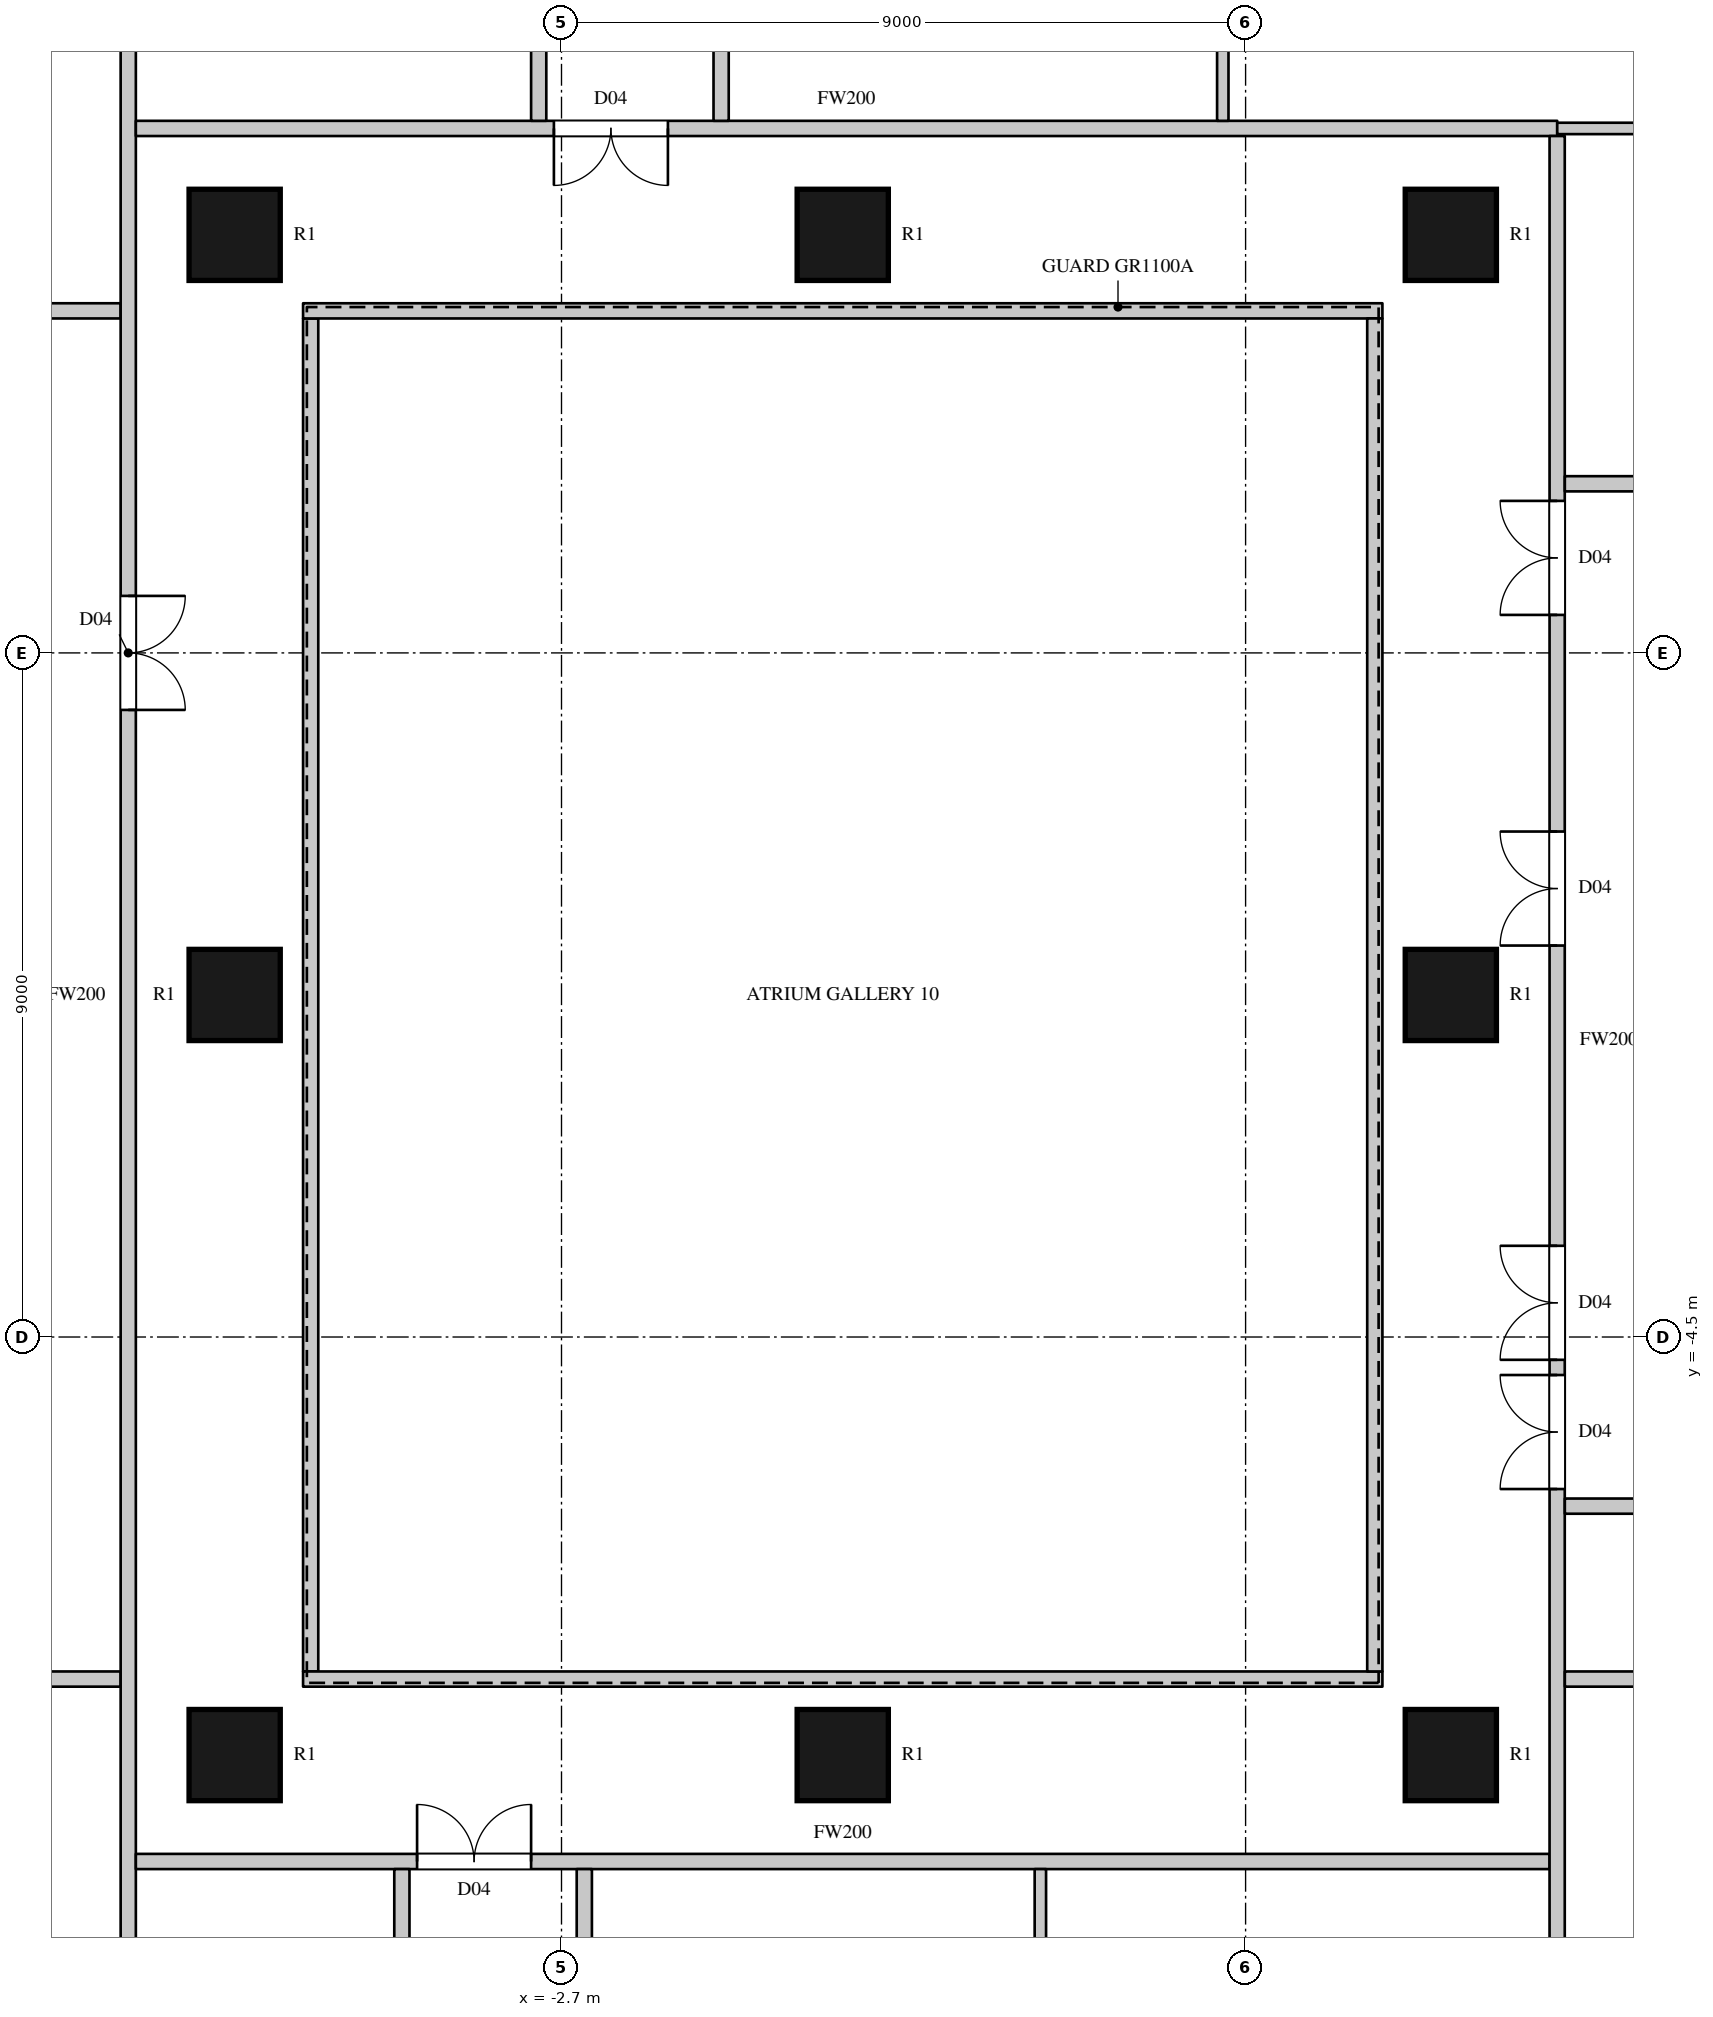
"""IFC4 building model, lengths in metres.
Left out: names, types, materials, properties, quantities, classifications, styles, units other than length and angle.
Written with IfcOpenShell. Run it as: python <this file> out.ifc"""

import sys

from ifc_helpers import new_model, si_unit, direction, frame, frame_2d, origin, origin_2d, place, context, subcontext, project, spatial, rectangle, circle, extrude, element, fill, save


model = new_model("IFC4")
c1 = context("Model", 3, precision=1e-05, world=origin(), true_north=direction((0.0, 1.0)))
c2 = subcontext(c1, "Body", "Model", "MODEL_VIEW")
j1 = project(units=[si_unit("LENGTHUNIT", "METRE"), si_unit("PLANEANGLEUNIT", "RADIAN")], contexts=[c1])
p1 = place(None, origin())
s1 = spatial("IfcSite", under=j1, at=p1, CompositionType="ELEMENT")
p2 = place(p1, origin())
s2 = spatial("IfcBuilding", under=s1, at=p2, CompositionType="ELEMENT")
p3 = place(p2, frame((0.0, 0.0, 66.3)))
s3 = spatial("IfcBuildingStorey", under=s2, at=p3, CompositionType="ELEMENT", Elevation=66.3)
for number, where, z_axis, x_axis in (
    (1, (-7.0, -10.0, 0.0), (0.0, 0.0, 1.0), (1.0, 0.0, 0.0)),
    (2, (-7.0, 0.0, 0.0), (0.0, 0.0, 1.0), (1.0, 0.0, 0.0)),
    (3, (-7.0, 10.0, 0.0), (0.0, 0.0, 1.0), (1.0, 0.0, 0.0)),
    (4, (1.0, -10.0, 0.0), (0.0, 0.0, 1.0), (1.0, 0.0, 0.0)),
    (5, (1.0, 10.0, 0.0), (0.0, 0.0, 1.0), (1.0, 0.0, 0.0)),
    (6, (9.0, -10.0, 0.0), (0.0, 0.0, 1.0), (1.0, 0.0, 0.0)),
    (7, (9.0, 0.0, 0.0), (0.0, 0.0, 1.0), (1.0, 0.0, 0.0)),
    (8, (9.0, 10.0, 0.0), (0.0, 0.0, 1.0), (1.0, 0.0, 0.0)),
):
    element("IfcColumn", number, at=place(p3, frame(where, z_axis=z_axis, x_axis=x_axis)), inside=s3, PredefinedType="COLUMN", context=c2, shape_type="SweptSolid", body=[
        extrude(circle(Radius=0.6, at=origin_2d()), origin(), (0.0, 0.0, 1.0), 3.6),
    ])
p4 = place(p3, frame((-13.97, -9.0, 0.0), z_axis=(0.0, 0.0, 1.0), x_axis=(1.0, 0.0, 0.0)))
e9 = element("IfcWall", 9, at=p4, inside=s3, PredefinedType="PARTITIONING", context=c2, shape_type="SweptSolid", body=[
    extrude(rectangle(XDim=5.47, YDim=0.2, at=frame_2d((2.735, 0.0))), origin(), (0.0, 0.0, 1.0), 3.3),
])
p5 = place(p4, frame((0.4, 0.0, 0.0)))
e10 = element("IfcOpeningElement", 10, at=p5, cuts=e9, PredefinedType="OPENING", context=c2, shape_type="SweptSolid", body=[
    extrude(rectangle(XDim=1.5, YDim=2.2, at=frame_2d((0.75, 1.1))), frame((0.0, 0.11, 0.0), z_axis=(0.0, -1.0, 0.0), x_axis=(1.0, 0.0, 0.0)), (0.0, 0.0, 1.0), 0.22),
])
p6 = place(p4, frame((2.05, 0.0, 0.0)))
e11 = element("IfcOpeningElement", 11, at=p6, cuts=e9, PredefinedType="OPENING", context=c2, shape_type="SweptSolid", body=[
    extrude(rectangle(XDim=1.5, YDim=2.2, at=frame_2d((0.75, 1.1))), frame((0.0, 0.11, 0.0), z_axis=(0.0, -1.0, 0.0), x_axis=(1.0, 0.0, 0.0)), (0.0, 0.0, 1.0), 0.22),
])
p7 = place(p3, frame((-13.97, 9.0, 0.0), z_axis=(0.0, 0.0, 1.0), x_axis=(1.0, 0.0, 0.0)))
e12 = element("IfcWall", 12, at=p7, inside=s3, PredefinedType="PARTITIONING", context=c2, shape_type="SweptSolid", body=[
    extrude(rectangle(XDim=5.47, YDim=0.2, at=frame_2d((2.735, 0.0))), origin(), (0.0, 0.0, 1.0), 3.3),
])
p8 = place(p3, frame((-8.4, -17.4, 0.0), z_axis=(0.0, 0.0, 1.0), x_axis=(0.0, 1.0, 0.0)))
e13 = element("IfcWall", 13, at=p8, inside=s3, PredefinedType="PARTITIONING", context=c2, shape_type="SweptSolid", body=[
    extrude(rectangle(XDim=34.8, YDim=0.2, at=frame_2d((17.4, 0.0))), origin(), (0.0, 0.0, 1.0), 3.3),
])
p9 = place(p8, frame((21.15, 0.0, 0.0)))
e14 = element("IfcOpeningElement", 14, at=p9, cuts=e13, PredefinedType="OPENING", context=c2, shape_type="SweptSolid", body=[
    extrude(rectangle(XDim=1.5, YDim=2.2, at=frame_2d((0.75, 1.1))), frame((0.0, 0.11, 0.0), z_axis=(0.0, -1.0, 0.0), x_axis=(1.0, 0.0, 0.0)), (0.0, 0.0, 1.0), 0.22),
])
p10 = place(p8, frame((33.75, 0.0, 0.0)))
e15 = element("IfcOpeningElement", 15, at=p10, cuts=e13, PredefinedType="OPENING", context=c2, shape_type="SweptSolid", body=[
    extrude(rectangle(XDim=0.9, YDim=2.2, at=frame_2d((0.45, 1.1))), frame((0.0, 0.11, 0.0), z_axis=(0.0, -1.0, 0.0), x_axis=(1.0, 0.0, 0.0)), (0.0, 0.0, 1.0), 0.22),
])
p11 = place(p8, frame((0.15, 0.0, 0.0)))
e16 = element("IfcOpeningElement", 16, at=p11, cuts=e13, PredefinedType="OPENING", context=c2, shape_type="SweptSolid", body=[
    extrude(rectangle(XDim=0.95, YDim=2.2, at=frame_2d((0.475, 1.1))), frame((0.0, 0.11, 0.0), z_axis=(0.0, -1.0, 0.0), x_axis=(1.0, 0.0, 0.0)), (0.0, 0.0, 1.0), 0.22),
])
p12 = place(p3, frame((-8.3, -11.4, 0.0), z_axis=(0.0, 0.0, 1.0), x_axis=(1.0, 0.0, 0.0)))
e17 = element("IfcWall", 17, at=p12, inside=s3, PredefinedType="PARTITIONING", context=c2, shape_type="SweptSolid", body=[
    extrude(rectangle(XDim=18.6, YDim=0.2, at=frame_2d((9.3, 0.0))), origin(), (0.0, 0.0, 1.0), 3.3),
])
p13 = place(p12, frame((3.7, 0.0, 0.0)))
e18 = element("IfcOpeningElement", 18, at=p13, cuts=e17, PredefinedType="OPENING", context=c2, shape_type="SweptSolid", body=[
    extrude(rectangle(XDim=1.5, YDim=2.2, at=frame_2d((0.75, 1.1))), frame((0.0, 0.11, 0.0), z_axis=(0.0, -1.0, 0.0), x_axis=(1.0, 0.0, 0.0)), (0.0, 0.0, 1.0), 0.22),
])
p14 = place(p3, frame((-8.3, 11.4, 0.0), z_axis=(0.0, 0.0, 1.0), x_axis=(1.0, 0.0, 0.0)))
e19 = element("IfcWall", 19, at=p14, inside=s3, PredefinedType="PARTITIONING", context=c2, shape_type="SweptSolid", body=[
    extrude(rectangle(XDim=18.7, YDim=0.2, at=frame_2d((9.35, 0.0))), origin(), (0.0, 0.0, 1.0), 3.3),
])
p15 = place(p14, frame((5.5, 0.0, 0.0)))
e20 = element("IfcOpeningElement", 20, at=p15, cuts=e19, PredefinedType="OPENING", context=c2, shape_type="SweptSolid", body=[
    extrude(rectangle(XDim=1.5, YDim=2.2, at=frame_2d((0.75, 1.1))), frame((0.0, 0.11, 0.0), z_axis=(0.0, -1.0, 0.0), x_axis=(1.0, 0.0, 0.0)), (0.0, 0.0, 1.0), 0.22),
])
p16 = place(p3, frame((-6.0, -8.9, 0.0), z_axis=(0.0, 0.0, 1.0), x_axis=(0.0, 1.0, 0.0)))
e21 = element("IfcWall", 21, at=p16, inside=s3, PredefinedType="PARTITIONING", context=c2, shape_type="SweptSolid", body=[
    extrude(rectangle(XDim=17.8, YDim=0.2, at=frame_2d((8.9, 0.0))), origin(), (0.0, 0.0, 1.0), 3.3),
])
for number, where, z_axis, x_axis in (
    (22, (-6.1, -9.0, 0.0), (0.0, 0.0, 1.0), (1.0, 0.0, 0.0)),
    (23, (-6.1, 9.0, 0.0), (0.0, 0.0, 1.0), (1.0, 0.0, 0.0)),
):
    element("IfcWall", number, at=place(p3, frame(where, z_axis=z_axis, x_axis=x_axis)), inside=s3, PredefinedType="PARTITIONING", context=c2, shape_type="SweptSolid", body=[
        extrude(rectangle(XDim=14.2, YDim=0.2, at=frame_2d((7.1, 0.0))), origin(), (0.0, 0.0, 1.0), 3.3),
    ])
p17 = place(p3, frame((-4.8, -17.4, 0.0), z_axis=(0.0, 0.0, 1.0), x_axis=(0.0, 1.0, 0.0)))
e24 = element("IfcWall", 24, at=p17, inside=s3, PredefinedType="PARTITIONING", context=c2, shape_type="SweptSolid", body=[
    extrude(rectangle(XDim=5.9, YDim=0.2, at=frame_2d((2.95, 0.0))), origin(), (0.0, 0.0, 1.0), 3.3),
])
p18 = place(p3, frame((-3.0, 11.5, 0.0), z_axis=(0.0, 0.0, 1.0), x_axis=(0.0, 1.0, 0.0)))
e25 = element("IfcWall", 25, at=p18, inside=s3, PredefinedType="PARTITIONING", context=c2, shape_type="SweptSolid", body=[
    extrude(rectangle(XDim=5.443, YDim=0.2, at=frame_2d((2.722, 0.0))), origin(), (0.0, 0.0, 1.0), 3.3),
])
p19 = place(p3, frame((-2.4, -16.943, 0.0), z_axis=(0.0, 0.0, 1.0), x_axis=(0.0, 1.0, 0.0)))
e26 = element("IfcWall", 26, at=p19, inside=s3, PredefinedType="PARTITIONING", context=c2, shape_type="SweptSolid", body=[
    extrude(rectangle(XDim=5.443, YDim=0.2, at=frame_2d((2.722, 0.0))), origin(), (0.0, 0.0, 1.0), 3.3),
])
p20 = place(p19, frame((0.3, 0.0, 0.0)))
e27 = element("IfcOpeningElement", 27, at=p20, cuts=e26, PredefinedType="OPENING", context=c2, shape_type="SweptSolid", body=[
    extrude(rectangle(XDim=0.95, YDim=2.2, at=frame_2d((0.475, 1.1))), frame((0.0, 0.11, 0.0), z_axis=(0.0, -1.0, 0.0), x_axis=(1.0, 0.0, 0.0)), (0.0, 0.0, 1.0), 0.22),
])
p21 = place(p3, frame((-0.6, 11.5, 0.0), z_axis=(0.0, 0.0, 1.0), x_axis=(0.0, 1.0, 0.0)))
e28 = element("IfcWall", 28, at=p21, inside=s3, PredefinedType="PARTITIONING", context=c2, shape_type="SweptSolid", body=[
    extrude(rectangle(XDim=5.9, YDim=0.2, at=frame_2d((2.95, 0.0))), origin(), (0.0, 0.0, 1.0), 3.3),
])
p22 = place(p21, frame((4.15, 0.0, 0.0)))
e29 = element("IfcOpeningElement", 29, at=p22, cuts=e28, PredefinedType="OPENING", context=c2, shape_type="SweptSolid", body=[
    extrude(rectangle(XDim=1.6, YDim=2.4, at=frame_2d((0.8, 1.2))), frame((0.0, 0.11, 0.0), z_axis=(0.0, -1.0, 0.0), x_axis=(1.0, 0.0, 0.0)), (0.0, 0.0, 1.0), 0.22),
])
p23 = place(p3, frame((8.0, -8.9, 0.0), z_axis=(0.0, 0.0, 1.0), x_axis=(0.0, 1.0, 0.0)))
e30 = element("IfcWall", 30, at=p23, inside=s3, PredefinedType="PARTITIONING", context=c2, shape_type="SweptSolid", body=[
    extrude(rectangle(XDim=17.8, YDim=0.2, at=frame_2d((8.9, 0.0))), origin(), (0.0, 0.0, 1.0), 3.3),
])
p24 = place(p3, frame((10.399, -12.5, 0.0), z_axis=(0.0, 0.0, 1.0), x_axis=(0.0, 1.0, 0.0)))
e31 = element("IfcWall", 31, at=p24, inside=s3, PredefinedType="PARTITIONING", context=c2, shape_type="SweptSolid", body=[
    extrude(rectangle(XDim=23.8, YDim=0.2, at=frame_2d((11.9, 0.0))), origin(), (0.0, 0.0, 1.0), 3.3),
])
p25 = place(p24, frame((6.0, 0.0, 0.0)))
e32 = element("IfcOpeningElement", 32, at=p25, cuts=e31, PredefinedType="OPENING", context=c2, shape_type="SweptSolid", body=[
    extrude(rectangle(XDim=1.5, YDim=2.2, at=frame_2d((0.75, 1.1))), frame((0.0, 0.11, 0.0), z_axis=(0.0, -1.0, 0.0), x_axis=(1.0, 0.0, 0.0)), (0.0, 0.0, 1.0), 0.22),
])
p26 = place(p24, frame((17.5, 0.0, 0.0)))
e33 = element("IfcOpeningElement", 33, at=p26, cuts=e31, PredefinedType="OPENING", context=c2, shape_type="SweptSolid", body=[
    extrude(rectangle(XDim=1.5, YDim=2.2, at=frame_2d((0.75, 1.1))), frame((0.0, 0.11, 0.0), z_axis=(0.0, -1.0, 0.0), x_axis=(1.0, 0.0, 0.0)), (0.0, 0.0, 1.0), 0.22),
])
p27 = place(p24, frame((7.7, 0.0, 0.0)))
e34 = element("IfcOpeningElement", 34, at=p27, cuts=e31, PredefinedType="OPENING", context=c2, shape_type="SweptSolid", body=[
    extrude(rectangle(XDim=1.5, YDim=2.2, at=frame_2d((0.75, 1.1))), frame((0.0, 0.11, 0.0), z_axis=(0.0, -1.0, 0.0), x_axis=(1.0, 0.0, 0.0)), (0.0, 0.0, 1.0), 0.22),
])
p28 = place(p24, frame((13.15, 0.0, 0.0)))
e35 = element("IfcOpeningElement", 35, at=p28, cuts=e31, PredefinedType="OPENING", context=c2, shape_type="SweptSolid", body=[
    extrude(rectangle(XDim=1.5, YDim=2.2, at=frame_2d((0.75, 1.1))), frame((0.0, 0.11, 0.0), z_axis=(0.0, -1.0, 0.0), x_axis=(1.0, 0.0, 0.0)), (0.0, 0.0, 1.0), 0.22),
])
p29 = place(p3, frame((10.5, -9.0, 0.0), z_axis=(0.0, 0.0, 1.0), x_axis=(1.0, 0.0, 0.0)))
e36 = element("IfcWall", 36, at=p29, inside=s3, PredefinedType="PARTITIONING", context=c2, shape_type="SweptSolid", body=[
    extrude(rectangle(XDim=5.7, YDim=0.2, at=frame_2d((2.85, 0.0))), origin(), (0.0, 0.0, 1.0), 2.65),
])
p30 = place(p29, frame((4.45, 0.0, 0.0)))
e37 = element("IfcOpeningElement", 37, at=p30, cuts=e36, PredefinedType="OPENING", context=c2, shape_type="SweptSolid", body=[
    extrude(rectangle(XDim=0.95, YDim=2.2, at=frame_2d((0.475, 1.1))), frame((0.0, 0.11, 0.0), z_axis=(0.0, -1.0, 0.0), x_axis=(1.0, 0.0, 0.0)), (0.0, 0.0, 1.0), 0.22),
])
p31 = place(p3, frame((10.5, -6.725, 0.0), z_axis=(0.0, 0.0, 1.0), x_axis=(1.0, 0.0, 0.0)))
e38 = element("IfcWall", 38, at=p31, inside=s3, PredefinedType="PARTITIONING", context=c2, shape_type="SweptSolid", body=[
    extrude(rectangle(XDim=5.7, YDim=0.2, at=frame_2d((2.85, 0.0))), origin(), (0.0, 0.0, 1.0), 3.3),
])
p32 = place(p3, frame((10.5, 6.725, 0.0), z_axis=(0.0, 0.0, 1.0), x_axis=(1.0, 0.0, 0.0)))
e39 = element("IfcWall", 39, at=p32, inside=s3, PredefinedType="PARTITIONING", context=c2, shape_type="SweptSolid", body=[
    extrude(rectangle(XDim=5.7, YDim=0.2, at=frame_2d((2.85, 0.0))), origin(), (0.0, 0.0, 1.0), 3.3),
])
p33 = place(p32, frame((4.5, 0.0, 0.0)))
e40 = element("IfcOpeningElement", 40, at=p33, cuts=e39, PredefinedType="OPENING", context=c2, shape_type="SweptSolid", body=[
    extrude(rectangle(XDim=0.9, YDim=2.2, at=frame_2d((0.45, 1.1))), frame((0.0, 0.11, 0.0), z_axis=(0.0, -1.0, 0.0), x_axis=(1.0, 0.0, 0.0)), (0.0, 0.0, 1.0), 0.22),
])
p34 = place(p3, frame((3.6, -17.4, 0.0), z_axis=(0.0, 0.0, 1.0), x_axis=(0.0, 1.0, 0.0)))
e41 = element("IfcWall", 41, at=p34, inside=s3, PredefinedType="PARTITIONING", context=c2, shape_type="SweptSolid", body=[
    extrude(rectangle(XDim=5.9, YDim=0.15, at=frame_2d((2.95, 0.0))), origin(), (0.0, 0.0, 1.0), 3.3),
])
p35 = place(p3, frame((6.0, 11.5, 0.0), z_axis=(0.0, 0.0, 1.0), x_axis=(0.0, 1.0, 0.0)))
e42 = element("IfcWall", 42, at=p35, inside=s3, PredefinedType="PARTITIONING", context=c2, shape_type="SweptSolid", body=[
    extrude(rectangle(XDim=5.453, YDim=0.15, at=frame_2d((2.727, 0.0))), origin(), (0.0, 0.0, 1.0), 3.3),
])
p36 = place(p3, frame((10.4, 11.4, 0.0), z_axis=(0.0, 0.0, 1.0), x_axis=(1.0, 0.0, 0.0)))
e43 = element("IfcWall", 43, at=p36, inside=s3, PredefinedType="PARTITIONING", context=c2, shape_type="SweptSolid", body=[
    extrude(rectangle(XDim=5.6, YDim=0.15, at=frame_2d((2.8, 0.0))), origin(), (0.0, 0.0, 1.0), 3.3),
])
p37 = place(p9, origin())
e44 = element("IfcDoor", 44, at=p37, inside=s3, OperationType="DOUBLE_DOOR_SINGLE_SWING", PredefinedType="DOOR", context=c2, shape_type="SweptSolid", body=[
    extrude(rectangle(XDim=1.5, YDim=2.2, at=frame_2d((0.75, 1.1))), frame((0.0, 0.025, 0.0), z_axis=(0.0, -1.0, 0.0), x_axis=(1.0, 0.0, 0.0)), (0.0, 0.0, 1.0), 0.05),
])
fill(e14, e44)
p38 = place(p13, origin())
e45 = element("IfcDoor", 45, at=p38, inside=s3, OperationType="DOUBLE_DOOR_SINGLE_SWING", PredefinedType="DOOR", context=c2, shape_type="SweptSolid", body=[
    extrude(rectangle(XDim=1.5, YDim=2.2, at=frame_2d((0.75, 1.1))), frame((0.0, 0.025, 0.0), z_axis=(0.0, -1.0, 0.0), x_axis=(1.0, 0.0, 0.0)), (0.0, 0.0, 1.0), 0.05),
])
fill(e18, e45)
p39 = place(p15, origin())
e46 = element("IfcDoor", 46, at=p39, inside=s3, OperationType="DOUBLE_DOOR_SINGLE_SWING", PredefinedType="DOOR", context=c2, shape_type="SweptSolid", body=[
    extrude(rectangle(XDim=1.5, YDim=2.2, at=frame_2d((0.75, 1.1))), frame((0.0, 0.025, 0.0), z_axis=(0.0, -1.0, 0.0), x_axis=(1.0, 0.0, 0.0)), (0.0, 0.0, 1.0), 0.05),
])
fill(e20, e46)
p40 = place(p25, origin())
e47 = element("IfcDoor", 47, at=p40, inside=s3, OperationType="DOUBLE_DOOR_SINGLE_SWING", PredefinedType="DOOR", context=c2, shape_type="SweptSolid", body=[
    extrude(rectangle(XDim=1.5, YDim=2.2, at=frame_2d((0.75, 1.1))), frame((0.0, 0.025, 0.0), z_axis=(0.0, -1.0, 0.0), x_axis=(1.0, 0.0, 0.0)), (0.0, 0.0, 1.0), 0.05),
])
fill(e32, e47)
p41 = place(p26, origin())
e48 = element("IfcDoor", 48, at=p41, inside=s3, OperationType="DOUBLE_DOOR_SINGLE_SWING", PredefinedType="DOOR", context=c2, shape_type="SweptSolid", body=[
    extrude(rectangle(XDim=1.5, YDim=2.2, at=frame_2d((0.75, 1.1))), frame((0.0, 0.025, 0.0), z_axis=(0.0, -1.0, 0.0), x_axis=(1.0, 0.0, 0.0)), (0.0, 0.0, 1.0), 0.05),
])
fill(e33, e48)
p42 = place(p27, origin())
e49 = element("IfcDoor", 49, at=p42, inside=s3, OperationType="DOUBLE_DOOR_SINGLE_SWING", PredefinedType="DOOR", context=c2, shape_type="SweptSolid", body=[
    extrude(rectangle(XDim=1.5, YDim=2.2, at=frame_2d((0.75, 1.1))), frame((0.0, 0.025, 0.0), z_axis=(0.0, -1.0, 0.0), x_axis=(1.0, 0.0, 0.0)), (0.0, 0.0, 1.0), 0.05),
])
fill(e34, e49)
p43 = place(p28, origin())
e50 = element("IfcDoor", 50, at=p43, inside=s3, OperationType="DOUBLE_DOOR_SINGLE_SWING", PredefinedType="DOOR", context=c2, shape_type="SweptSolid", body=[
    extrude(rectangle(XDim=1.5, YDim=2.2, at=frame_2d((0.75, 1.1))), frame((0.0, 0.025, 0.0), z_axis=(0.0, -1.0, 0.0), x_axis=(1.0, 0.0, 0.0)), (0.0, 0.0, 1.0), 0.05),
])
fill(e35, e50)
save(model, sys.argv[1])
